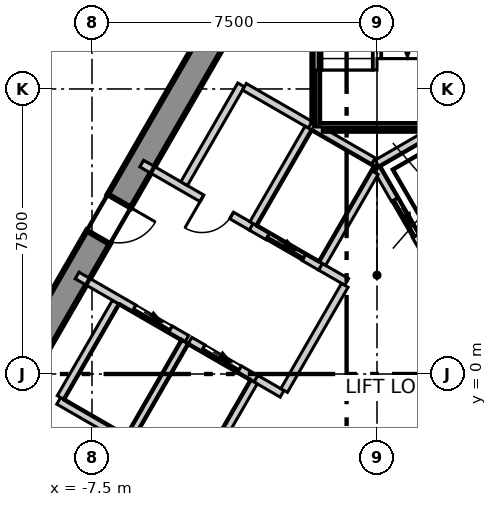
"""IFC4 building model, lengths in metres.
Left out: names, types, materials, properties, quantities, classifications, styles, units other than length and angle.
Written with IfcOpenShell. Run it as: python <this file> out.ifc"""

import sys

from ifc_helpers import new_model, si_unit, direction, frame, frame_2d, origin, place, context, subcontext, project, spatial, polyline, rectangle, outline, extrude, element, fill, save


model = new_model("IFC4")
c1 = context("Model", 3, precision=1e-05, world=origin(), true_north=direction((0.0, 1.0)))
c2 = subcontext(c1, "Body", "Model", "MODEL_VIEW")
j1 = project(units=[si_unit("LENGTHUNIT", "METRE"), si_unit("PLANEANGLEUNIT", "RADIAN")], contexts=[c1])
p1 = place(None, origin())
s1 = spatial("IfcSite", under=j1, at=p1, CompositionType="ELEMENT")
p2 = place(p1, origin())
s2 = spatial("IfcBuilding", under=s1, at=p2, CompositionType="ELEMENT")
p3 = place(p2, frame((0.0, 0.0, 191.3)))
s3 = spatial("IfcBuildingStorey", under=s2, at=p3, CompositionType="ELEMENT", Elevation=191.3)
p4 = place(p3, frame((-1.703, 13.35, -0.3), z_axis=(0.0, 0.0, 1.0), x_axis=(-0.500011533395, -0.866018744874, 0.0)))
e1 = element("IfcWall", 1, at=p4, inside=s3, PredefinedType="SHEAR", context=c2, shape_type="SweptSolid", body=[
    extrude(outline(polyline([(-0.202, -0.35), (1.782, -0.35), (3.766, -0.35), (5.75, -0.35), (7.734, -0.35), (9.718, -0.35), (11.702, -0.35), (13.686, -0.35), (15.67, -0.35), (17.654, -0.35), (19.638, -0.35), (21.622, -0.35), (21.218, 0.35), (19.307, 0.35), (17.397, 0.35), (15.486, 0.35), (13.576, 0.35), (11.665, 0.35), (9.755, 0.35), (7.844, 0.35), (5.934, 0.35), (4.023, 0.35), (2.113, 0.35), (0.202, 0.35), (-0.202, -0.35)])), origin(), (0.0, 0.0, 1.0), 4.0),
])
p5 = place(p4, frame((10.16, 0.0, 0.3)))
e2 = element("IfcOpeningElement", 2, at=p5, cuts=e1, PredefinedType="OPENING", context=c2, shape_type="SweptSolid", body=[
    extrude(rectangle(XDim=1.1, YDim=2.1, at=frame_2d((0.55, 1.05))), frame((0.0, 0.36, 0.0), z_axis=(0.0, -1.0, 0.0), x_axis=(1.0, 0.0, 0.0)), (0.0, 0.0, 1.0), 0.72),
])
p6 = place(p3, frame((-2.869, 32.02, 0.0), z_axis=(0.0, 0.0, 1.0), x_axis=(-0.500006930241, -0.866021402571, 0.0)))
e3 = element("IfcWall", 3, at=p6, inside=s3, PredefinedType="ELEMENTEDWALL", context=c2, shape_type="SweptSolid", body=[
    extrude(rectangle(XDim=52.572, YDim=0.2, at=frame_2d((26.286, 0.0))), origin(), (0.0, 0.0, 1.0), 3.7),
])
p7 = place(p6, frame((2.327, 0.0, 0.9)))
e4 = element("IfcOpeningElement", 4, at=p7, cuts=e3, PredefinedType="OPENING", context=c2, shape_type="SweptSolid", body=[
    extrude(rectangle(XDim=4.2, YDim=2.5, at=frame_2d((2.1, 1.25))), frame((0.0, 0.11, 0.0), z_axis=(0.0, -1.0, 0.0), x_axis=(1.0, 0.0, 0.0)), (0.0, 0.0, 1.0), 0.22),
])
p8 = place(p6, frame((8.575, 0.0, 0.9)))
e5 = element("IfcOpeningElement", 5, at=p8, cuts=e3, PredefinedType="OPENING", context=c2, shape_type="SweptSolid", body=[
    extrude(rectangle(XDim=4.2, YDim=2.5, at=frame_2d((2.1, 1.25))), frame((0.0, 0.11, 0.0), z_axis=(0.0, -1.0, 0.0), x_axis=(1.0, 0.0, 0.0)), (0.0, 0.0, 1.0), 0.22),
])
p9 = place(p6, frame((14.823, 0.0, 0.9)))
e6 = element("IfcOpeningElement", 6, at=p9, cuts=e3, PredefinedType="OPENING", context=c2, shape_type="SweptSolid", body=[
    extrude(rectangle(XDim=4.2, YDim=2.5, at=frame_2d((2.1, 1.25))), frame((0.0, 0.11, 0.0), z_axis=(0.0, -1.0, 0.0), x_axis=(1.0, 0.0, 0.0)), (0.0, 0.0, 1.0), 0.22),
])
p10 = place(p6, frame((21.071, 0.0, 0.9)))
e7 = element("IfcOpeningElement", 7, at=p10, cuts=e3, PredefinedType="OPENING", context=c2, shape_type="SweptSolid", body=[
    extrude(rectangle(XDim=4.2, YDim=2.5, at=frame_2d((2.1, 1.25))), frame((0.0, 0.11, 0.0), z_axis=(0.0, -1.0, 0.0), x_axis=(1.0, 0.0, 0.0)), (0.0, 0.0, 1.0), 0.22),
])
p11 = place(p6, frame((27.319, 0.0, 0.9)))
e8 = element("IfcOpeningElement", 8, at=p11, cuts=e3, PredefinedType="OPENING", context=c2, shape_type="SweptSolid", body=[
    extrude(rectangle(XDim=4.2, YDim=2.5, at=frame_2d((2.1, 1.25))), frame((0.0, 0.11, 0.0), z_axis=(0.0, -1.0, 0.0), x_axis=(1.0, 0.0, 0.0)), (0.0, 0.0, 1.0), 0.22),
])
p12 = place(p6, frame((33.568, 0.0, 0.9)))
e9 = element("IfcOpeningElement", 9, at=p12, cuts=e3, PredefinedType="OPENING", context=c2, shape_type="SweptSolid", body=[
    extrude(rectangle(XDim=4.2, YDim=2.5, at=frame_2d((2.1, 1.25))), frame((0.0, 0.11, 0.0), z_axis=(0.0, -1.0, 0.0), x_axis=(1.0, 0.0, 0.0)), (0.0, 0.0, 1.0), 0.22),
])
p13 = place(p6, frame((39.816, 0.0, 0.9)))
e10 = element("IfcOpeningElement", 10, at=p13, cuts=e3, PredefinedType="OPENING", context=c2, shape_type="SweptSolid", body=[
    extrude(rectangle(XDim=4.2, YDim=2.5, at=frame_2d((2.1, 1.25))), frame((0.0, 0.11, 0.0), z_axis=(0.0, -1.0, 0.0), x_axis=(1.0, 0.0, 0.0)), (0.0, 0.0, 1.0), 0.22),
])
p14 = place(p6, frame((46.064, 0.0, 0.9)))
e11 = element("IfcOpeningElement", 11, at=p14, cuts=e3, PredefinedType="OPENING", context=c2, shape_type="SweptSolid", body=[
    extrude(rectangle(XDim=4.2, YDim=2.5, at=frame_2d((2.1, 1.25))), frame((0.0, 0.11, 0.0), z_axis=(0.0, -1.0, 0.0), x_axis=(1.0, 0.0, 0.0)), (0.0, 0.0, 1.0), 0.22),
])
p15 = place(p3, frame((-20.882, -11.969, 0.0), z_axis=(0.0, 0.0, 1.0), x_axis=(0.499998738735, 0.866026131975, 0.0)))
e12 = element("IfcWall", 12, at=p15, inside=s3, PredefinedType="PARTITIONING", context=c2, shape_type="SweptSolid", body=[
    extrude(rectangle(XDim=41.764, YDim=0.15, at=frame_2d((20.882, 0.0))), origin(), (0.0, 0.0, 1.0), 3.7),
])
p16 = place(p15, frame((37.014, 0.0, 0.0)))
e13 = element("IfcOpeningElement", 13, at=p16, cuts=e12, PredefinedType="OPENING", context=c2, shape_type="SweptSolid", body=[
    extrude(rectangle(XDim=1.0, YDim=2.1, at=frame_2d((0.5, 1.05))), frame((0.0, 0.085, 0.0), z_axis=(0.0, -1.0, 0.0), x_axis=(1.0, 0.0, 0.0)), (0.0, 0.0, 1.0), 0.17),
])
p17 = place(p15, frame((29.653, 0.0, 0.0)))
e14 = element("IfcOpeningElement", 14, at=p17, cuts=e12, PredefinedType="OPENING", context=c2, shape_type="SweptSolid", body=[
    extrude(rectangle(XDim=1.0, YDim=2.1, at=frame_2d((0.5, 1.05))), frame((0.0, 0.085, 0.0), z_axis=(0.0, -1.0, 0.0), x_axis=(1.0, 0.0, 0.0)), (0.0, 0.0, 1.0), 0.17),
])
p18 = place(p15, frame((23.405, 0.0, 0.0)))
e15 = element("IfcOpeningElement", 15, at=p18, cuts=e12, PredefinedType="OPENING", context=c2, shape_type="SweptSolid", body=[
    extrude(rectangle(XDim=1.0, YDim=2.1, at=frame_2d((0.5, 1.05))), frame((0.0, 0.085, 0.0), z_axis=(0.0, -1.0, 0.0), x_axis=(1.0, 0.0, 0.0)), (0.0, 0.0, 1.0), 0.17),
])
p19 = place(p15, frame((9.657, 0.0, 0.0)))
e16 = element("IfcOpeningElement", 16, at=p19, cuts=e12, PredefinedType="OPENING", context=c2, shape_type="SweptSolid", body=[
    extrude(rectangle(XDim=1.1, YDim=2.1, at=frame_2d((0.55, 1.05))), frame((0.0, 0.085, 0.0), z_axis=(0.0, -1.0, 0.0), x_axis=(1.0, 0.0, 0.0)), (0.0, 0.0, 1.0), 0.17),
])
p20 = place(p15, frame((18.757, 0.0, 0.0)))
e17 = element("IfcOpeningElement", 17, at=p20, cuts=e12, PredefinedType="OPENING", context=c2, shape_type="SweptSolid", body=[
    extrude(rectangle(XDim=0.9, YDim=2.1, at=frame_2d((0.45, 1.05))), frame((0.0, 0.085, 0.0), z_axis=(0.0, -1.0, 0.0), x_axis=(1.0, 0.0, 0.0)), (0.0, 0.0, 1.0), 0.17),
])
p21 = place(p15, frame((15.557, 0.0, 0.0)))
e18 = element("IfcOpeningElement", 18, at=p21, cuts=e12, PredefinedType="OPENING", context=c2, shape_type="SweptSolid", body=[
    extrude(rectangle(XDim=0.9, YDim=2.1, at=frame_2d((0.45, 1.05))), frame((0.0, 0.085, 0.0), z_axis=(0.0, -1.0, 0.0), x_axis=(1.0, 0.0, 0.0)), (0.0, 0.0, 1.0), 0.17),
])
p22 = place(p15, frame((12.657, 0.0, 0.0)))
e19 = element("IfcOpeningElement", 19, at=p22, cuts=e12, PredefinedType="OPENING", context=c2, shape_type="SweptSolid", body=[
    extrude(rectangle(XDim=1.0, YDim=2.1, at=frame_2d((0.5, 1.05))), frame((0.0, 0.085, 0.0), z_axis=(0.0, -1.0, 0.0), x_axis=(1.0, 0.0, 0.0)), (0.0, 0.0, 1.0), 0.17),
])
p23 = place(p15, frame((3.56, 0.0, 0.0)))
e20 = element("IfcOpeningElement", 20, at=p23, cuts=e12, PredefinedType="OPENING", context=c2, shape_type="SweptSolid", body=[
    extrude(rectangle(XDim=1.1, YDim=2.1, at=frame_2d((0.55, 1.05))), frame((0.0, 0.085, 0.0), z_axis=(0.0, -1.0, 0.0), x_axis=(1.0, 0.0, 0.0)), (0.0, 0.0, 1.0), 0.17),
])
p24 = place(p3, frame((0.075, 24.07, 0.0), z_axis=(0.0, 0.0, 1.0), x_axis=(0.49999939571, -0.866025752671, 0.0)))
e21 = element("IfcWall", 21, at=p24, inside=s3, PredefinedType="PARTITIONING", context=c2, shape_type="SweptSolid", body=[
    extrude(rectangle(XDim=41.614, YDim=0.15, at=frame_2d((20.807, 0.0))), origin(), (0.0, 0.0, 1.0), 3.7),
])
p25 = place(p24, frame((37.015, 0.0, 0.0)))
e22 = element("IfcOpeningElement", 22, at=p25, cuts=e21, PredefinedType="OPENING", context=c2, shape_type="SweptSolid", body=[
    extrude(rectangle(XDim=1.1, YDim=2.1, at=frame_2d((0.55, 1.05))), frame((0.0, 0.085, 0.0), z_axis=(0.0, -1.0, 0.0), x_axis=(1.0, 0.0, 0.0)), (0.0, 0.0, 1.0), 0.17),
])
p26 = place(p24, frame((25.154, 0.0, 0.0)))
e23 = element("IfcOpeningElement", 23, at=p26, cuts=e21, PredefinedType="OPENING", context=c2, shape_type="SweptSolid", body=[
    extrude(rectangle(XDim=1.0, YDim=2.1, at=frame_2d((0.5, 1.05))), frame((0.0, 0.085, 0.0), z_axis=(0.0, -1.0, 0.0), x_axis=(1.0, 0.0, 0.0)), (0.0, 0.0, 1.0), 0.17),
])
p27 = place(p24, frame((31.454, 0.0, 0.0)))
e24 = element("IfcOpeningElement", 24, at=p27, cuts=e21, PredefinedType="OPENING", context=c2, shape_type="SweptSolid", body=[
    extrude(rectangle(XDim=0.9, YDim=2.1, at=frame_2d((0.45, 1.05))), frame((0.0, 0.085, 0.0), z_axis=(0.0, -1.0, 0.0), x_axis=(1.0, 0.0, 0.0)), (0.0, 0.0, 1.0), 0.17),
])
p28 = place(p24, frame((17.157, 0.0, 0.0)))
e25 = element("IfcOpeningElement", 25, at=p28, cuts=e21, PredefinedType="OPENING", context=c2, shape_type="SweptSolid", body=[
    extrude(rectangle(XDim=1.0, YDim=2.1, at=frame_2d((0.5, 1.05))), frame((0.0, 0.085, 0.0), z_axis=(0.0, -1.0, 0.0), x_axis=(1.0, 0.0, 0.0)), (0.0, 0.0, 1.0), 0.17),
])
p29 = place(p24, frame((6.609, 0.0, 0.0)))
e26 = element("IfcOpeningElement", 26, at=p29, cuts=e21, PredefinedType="OPENING", context=c2, shape_type="SweptSolid", body=[
    extrude(rectangle(XDim=1.1, YDim=2.1, at=frame_2d((0.55, 1.05))), frame((0.0, 0.085, 0.0), z_axis=(0.0, -1.0, 0.0), x_axis=(1.0, 0.0, 0.0)), (0.0, 0.0, 1.0), 0.17),
])
p30 = place(p3, frame((-8.376, -0.707, 0.0), z_axis=(0.0, 0.0, 1.0), x_axis=(0.866067520717, -0.499927044236, 0.0)))
e27 = element("IfcWall", 27, at=p30, inside=s3, PredefinedType="SOLIDWALL", context=c2, shape_type="SweptSolid", body=[
    extrude(rectangle(XDim=2.1, YDim=0.2, at=frame_2d((1.05, 0.0))), origin(), (0.0, 0.0, 1.0), 3.7),
])
p31 = place(p3, frame((-8.326, -0.62, 0.0), z_axis=(0.0, 0.0, 1.0), x_axis=(0.500023687443, 0.866011727401, 0.0)))
e28 = element("IfcWall", 28, at=p31, inside=s3, PredefinedType="SOLIDWALL", context=c2, shape_type="SweptSolid", body=[
    extrude(rectangle(XDim=2.9, YDim=0.2, at=frame_2d((1.45, 0.0))), origin(), (0.0, 0.0, 1.0), 3.7),
])
p32 = place(p3, frame((-0.002, 5.541, 0.0), z_axis=(0.0, 0.0, 1.0), x_axis=(0.86600155993, 0.500041296494, 0.0)))
e29 = element("IfcWall", 29, at=p32, inside=s3, PredefinedType="SOLIDWALL", context=c2, shape_type="SweptSolid", body=[
    extrude(rectangle(XDim=4.132, YDim=0.2, at=frame_2d((2.066, 0.0))), origin(), (0.0, 0.0, 1.0), 3.7),
])
p33 = place(p3, frame((0.0, 5.4, 0.0), z_axis=(0.0, 0.0, 1.0), x_axis=(0.500103862429, -0.865965430478, 0.0)))
e30 = element("IfcWall", 30, at=p33, inside=s3, PredefinedType="SOLIDWALL", context=c2, shape_type="SweptSolid", body=[
    extrude(rectangle(XDim=2.973, YDim=0.2, at=frame_2d((1.487, 0.0))), origin(), (0.0, 0.0, 1.0), 3.7),
])
p34 = place(p33, frame((0.937, 0.0, 0.0)))
e31 = element("IfcOpeningElement", 31, at=p34, cuts=e30, PredefinedType="OPENING", context=c2, shape_type="SweptSolid", body=[
    extrude(rectangle(XDim=1.1, YDim=2.1, at=frame_2d((0.55, 1.05))), frame((0.0, 0.11, 0.0), z_axis=(0.0, -1.0, 0.0), x_axis=(1.0, 0.0, 0.0)), (0.0, 0.0, 1.0), 0.22),
])
p35 = place(p3, frame((-7.891, 2.593, 0.0), z_axis=(0.0, 0.0, 1.0), x_axis=(0.866070917804, -0.499921159118, 0.0)))
e32 = element("IfcWall", 32, at=p35, inside=s3, PredefinedType="SOLIDWALL", context=c2, shape_type="SweptSolid", body=[
    extrude(rectangle(XDim=3.333, YDim=0.2, at=frame_2d((1.666, 0.0))), origin(), (0.0, 0.0, 1.0), 3.7),
])
p36 = place(p35, frame((1.73, 0.0, 0.0)))
e33 = element("IfcOpeningElement", 33, at=p36, cuts=e32, PredefinedType="OPENING", context=c2, shape_type="SweptSolid", body=[
    extrude(rectangle(XDim=1.1, YDim=2.1, at=frame_2d((0.55, 1.05))), frame((0.0, 0.11, 0.0), z_axis=(0.0, -1.0, 0.0), x_axis=(1.0, 0.0, 0.0)), (0.0, 0.0, 1.0), 0.22),
])
p37 = place(p3, frame((-3.188, -0.122, 0.0), z_axis=(0.0, 0.0, 1.0), x_axis=(0.865705793592, -0.50055317294, 0.0)))
e34 = element("IfcWall", 34, at=p37, inside=s3, PredefinedType="SOLIDWALL", context=c2, shape_type="SweptSolid", body=[
    extrude(rectangle(XDim=0.797, YDim=0.2, at=frame_2d((0.398, 0.0))), origin(), (0.0, 0.0, 1.0), 3.7),
])
p38 = place(p3, frame((-6.191, 5.537, 0.0), z_axis=(0.0, 0.0, 1.0), x_axis=(0.866052607023, -0.499952879648, 0.0)))
e35 = element("IfcWall", 35, at=p38, inside=s3, PredefinedType="SOLIDWALL", context=c2, shape_type="SweptSolid", body=[
    extrude(rectangle(XDim=3.332, YDim=0.2, at=frame_2d((1.666, 0.0))), origin(), (0.0, 0.0, 1.0), 3.7),
])
p39 = place(p38, frame((1.83, 0.0, 0.0)))
e36 = element("IfcOpeningElement", 36, at=p39, cuts=e35, PredefinedType="OPENING", context=c2, shape_type="SweptSolid", body=[
    extrude(rectangle(XDim=0.9, YDim=2.1, at=frame_2d((0.45, 1.05))), frame((0.0, 0.11, 0.0), z_axis=(0.0, -1.0, 0.0), x_axis=(1.0, 0.0, 0.0)), (0.0, 0.0, 1.0), 0.22),
])
p40 = place(p3, frame((-1.488, 2.822, 0.0), z_axis=(0.0, 0.0, 1.0), x_axis=(0.866236612152, -0.499633997809, 0.0)))
e37 = element("IfcWall", 37, at=p40, inside=s3, PredefinedType="SOLIDWALL", context=c2, shape_type="SweptSolid", body=[
    extrude(rectangle(XDim=0.796, YDim=0.2, at=frame_2d((0.398, 0.0))), origin(), (0.0, 0.0, 1.0), 3.7),
])
p41 = place(p3, frame((-5.076, 5.009, 0.0), z_axis=(0.0, 0.0, 1.0), x_axis=(0.50002537861, 0.866010750942, 0.0)))
e38 = element("IfcWall", 38, at=p41, inside=s3, PredefinedType="SOLIDWALL", context=c2, shape_type="SweptSolid", body=[
    extrude(rectangle(XDim=3.0, YDim=0.2, at=frame_2d((1.5, 0.0))), origin(), (0.0, 0.0, 1.0), 3.7),
])
p42 = place(p3, frame((-3.489, 7.557, 0.0), z_axis=(0.0, 0.0, 1.0), x_axis=(0.866010750942, -0.50002537861, 0.0)))
e39 = element("IfcWall", 39, at=p42, inside=s3, PredefinedType="SOLIDWALL", context=c2, shape_type="SweptSolid", body=[
    extrude(rectangle(XDim=2.0, YDim=0.2, at=frame_2d((1.0, 0.0))), origin(), (0.0, 0.0, 1.0), 3.7),
])
p43 = place(p3, frame((-2.444, -0.433, 0.0), z_axis=(0.0, 0.0, 1.0), x_axis=(0.500035624827, 0.866004834804, 0.0)))
e40 = element("IfcWall", 40, at=p43, inside=s3, PredefinedType="SOLIDWALL", context=c2, shape_type="SweptSolid", body=[
    extrude(rectangle(XDim=3.194, YDim=0.2, at=frame_2d((1.597, 0.0))), origin(), (0.0, 0.0, 1.0), 3.7),
])
p44 = place(p3, frame((-6.507, -1.67, 0.0), z_axis=(0.0, 0.0, 1.0), x_axis=(0.50012328804, 0.865954211699, 0.0)))
e41 = element("IfcWall", 41, at=p44, inside=s3, PredefinedType="SOLIDWALL", context=c2, shape_type="SweptSolid", body=[
    extrude(rectangle(XDim=2.9, YDim=0.2, at=frame_2d((1.45, 0.0))), origin(), (0.0, 0.0, 1.0), 3.7),
])
p45 = place(p3, frame((-4.922, 0.879, 0.0), z_axis=(0.0, 0.0, 1.0), x_axis=(0.866073918653, -0.499915960366, 0.0)))
e42 = element("IfcWall", 42, at=p45, inside=s3, PredefinedType="SOLIDWALL", context=c2, shape_type="SweptSolid", body=[
    extrude(rectangle(XDim=2.002, YDim=0.2, at=frame_2d((1.001, 0.0))), origin(), (0.0, 0.0, 1.0), 3.7),
])
p46 = place(p45, frame((0.402, 0.0, 0.0)))
e43 = element("IfcOpeningElement", 43, at=p46, cuts=e42, PredefinedType="OPENING", context=c2, shape_type="SweptSolid", body=[
    extrude(rectangle(XDim=1.1, YDim=2.1, at=frame_2d((0.55, 1.05))), frame((0.0, 0.11, 0.0), z_axis=(0.0, -1.0, 0.0), x_axis=(1.0, 0.0, 0.0)), (0.0, 0.0, 1.0), 0.22),
])
p47 = place(p3, frame((-4.619, -2.6, 0.0), z_axis=(0.0, 0.0, 1.0), x_axis=(0.50009492287, 0.865970593103, 0.0)))
e44 = element("IfcWall", 44, at=p47, inside=s3, PredefinedType="SOLIDWALL", context=c2, shape_type="SweptSolid", body=[
    extrude(rectangle(XDim=2.761, YDim=0.2, at=frame_2d((1.381, 0.0))), origin(), (0.0, 0.0, 1.0), 3.7),
])
p48 = place(p3, frame((-3.309, 3.873, 0.0), z_axis=(0.0, 0.0, 1.0), x_axis=(0.866098583652, -0.499873227325, 0.0)))
e45 = element("IfcWall", 45, at=p48, inside=s3, PredefinedType="SOLIDWALL", context=c2, shape_type="SweptSolid", body=[
    extrude(rectangle(XDim=2.103, YDim=0.2, at=frame_2d((1.051, 0.0))), origin(), (0.0, 0.0, 1.0), 3.7),
])
p49 = place(p48, frame((0.502, 0.0, 0.0)))
e46 = element("IfcOpeningElement", 46, at=p49, cuts=e45, PredefinedType="OPENING", context=c2, shape_type="SweptSolid", body=[
    extrude(rectangle(XDim=1.1, YDim=2.1, at=frame_2d((0.55, 1.05))), frame((0.0, 0.11, 0.0), z_axis=(0.0, -1.0, 0.0), x_axis=(1.0, 0.0, 0.0)), (0.0, 0.0, 1.0), 0.22),
])
p50 = place(p3, frame((-3.257, 3.959, 0.0), z_axis=(0.0, 0.0, 1.0), x_axis=(0.50012328804, 0.865954211699, 0.0)))
e47 = element("IfcWall", 47, at=p50, inside=s3, PredefinedType="SOLIDWALL", context=c2, shape_type="SweptSolid", body=[
    extrude(rectangle(XDim=2.9, YDim=0.2, at=frame_2d((1.45, 0.0))), origin(), (0.0, 0.0, 1.0), 3.7),
])
p51 = place(p3, frame((-1.67, 6.507, 0.0), z_axis=(0.0, 0.0, 1.0), x_axis=(0.865941441609, -0.500145398563, 0.0)))
e48 = element("IfcWall", 48, at=p51, inside=s3, PredefinedType="SOLIDWALL", context=c2, shape_type="SweptSolid", body=[
    extrude(rectangle(XDim=1.815, YDim=0.2, at=frame_2d((0.908, 0.0))), origin(), (0.0, 0.0, 1.0), 3.7),
])
p52 = place(p3, frame((-1.438, 2.909, 0.0), z_axis=(0.0, 0.0, 1.0), x_axis=(0.499829630636, 0.866123744241, 0.0)))
e49 = element("IfcWall", 49, at=p52, inside=s3, PredefinedType="SOLIDWALL", context=c2, shape_type="SweptSolid", body=[
    extrude(rectangle(XDim=2.761, YDim=0.2, at=frame_2d((1.38, 0.0))), origin(), (0.0, 0.0, 1.0), 3.7),
])
p53 = place(p3, frame((-1.4, 6.5, 0.0), z_axis=(0.0, 0.0, 1.0), x_axis=(1.0, 0.0, 0.0)))
e50 = element("IfcWall", 50, at=p53, inside=s3, PredefinedType="SOLIDWALL", context=c2, shape_type="SweptSolid", body=[
    extrude(rectangle(XDim=2.8, YDim=0.2, at=frame_2d((1.4, 0.0))), origin(), (0.0, 0.0, 1.0), 3.7),
])
p54 = place(p3, frame((-1.6, 6.615, 0.0), z_axis=(0.0, 0.0, 1.0), x_axis=(0.0, 1.0, 0.0)))
e51 = element("IfcWall", 51, at=p54, inside=s3, PredefinedType="SOLIDWALL", context=c2, shape_type="SweptSolid", body=[
    extrude(rectangle(XDim=6.715, YDim=0.2, at=frame_2d((3.357, 0.0))), origin(), (0.0, 0.0, 1.0), 3.7),
])
p55 = place(p34, origin())
e52 = element("IfcDoor", 52, at=p55, inside=s3, OperationType="SLIDING_TO_LEFT", PredefinedType="DOOR", context=c2, shape_type="SweptSolid", body=[
    extrude(rectangle(XDim=1.1, YDim=2.1, at=frame_2d((0.55, 1.05))), frame((0.0, 0.025, 0.0), z_axis=(0.0, -1.0, 0.0), x_axis=(1.0, 0.0, 0.0)), (0.0, 0.0, 1.0), 0.05),
])
fill(e31, e52)
p56 = place(p46, origin())
e53 = element("IfcDoor", 53, at=p56, inside=s3, OperationType="SLIDING_TO_LEFT", PredefinedType="DOOR", context=c2, shape_type="SweptSolid", body=[
    extrude(rectangle(XDim=1.1, YDim=2.1, at=frame_2d((0.55, 1.05))), frame((0.0, 0.025, 0.0), z_axis=(0.0, -1.0, 0.0), x_axis=(1.0, 0.0, 0.0)), (0.0, 0.0, 1.0), 0.05),
])
fill(e43, e53)
p57 = place(p49, origin())
e54 = element("IfcDoor", 54, at=p57, inside=s3, OperationType="SLIDING_TO_LEFT", PredefinedType="DOOR", context=c2, shape_type="SweptSolid", body=[
    extrude(rectangle(XDim=1.1, YDim=2.1, at=frame_2d((0.55, 1.05))), frame((0.0, 0.025, 0.0), z_axis=(0.0, -1.0, 0.0), x_axis=(1.0, 0.0, 0.0)), (0.0, 0.0, 1.0), 0.05),
])
fill(e46, e54)
p58 = place(p36, origin())
e55 = element("IfcDoor", 55, at=p58, inside=s3, OperationType="SLIDING_TO_LEFT", PredefinedType="DOOR", context=c2, shape_type="SweptSolid", body=[
    extrude(rectangle(XDim=1.1, YDim=2.1, at=frame_2d((0.55, 1.05))), frame((0.0, 0.025, 0.0), z_axis=(0.0, -1.0, 0.0), x_axis=(1.0, 0.0, 0.0)), (0.0, 0.0, 1.0), 0.05),
])
fill(e33, e55)
p59 = place(p39, origin())
e56 = element("IfcDoor", 56, at=p59, inside=s3, OperationType="SINGLE_SWING_LEFT", PredefinedType="DOOR", context=c2, shape_type="SweptSolid", body=[
    extrude(rectangle(XDim=0.9, YDim=2.1, at=frame_2d((0.45, 1.05))), frame((0.0, 0.025, 0.0), z_axis=(0.0, -1.0, 0.0), x_axis=(1.0, 0.0, 0.0)), (0.0, 0.0, 1.0), 0.05),
])
fill(e36, e56)
p60 = place(p5, origin())
e57 = element("IfcDoor", 57, at=p60, inside=s3, OperationType="SINGLE_SWING_RIGHT", PredefinedType="DOOR", context=c2, shape_type="SweptSolid", body=[
    extrude(rectangle(XDim=1.1, YDim=2.1, at=frame_2d((0.55, 1.05))), frame((0.0, 0.025, 0.0), z_axis=(0.0, -1.0, 0.0), x_axis=(1.0, 0.0, 0.0)), (0.0, 0.0, 1.0), 0.05),
])
fill(e2, e57)
save(model, sys.argv[1])
